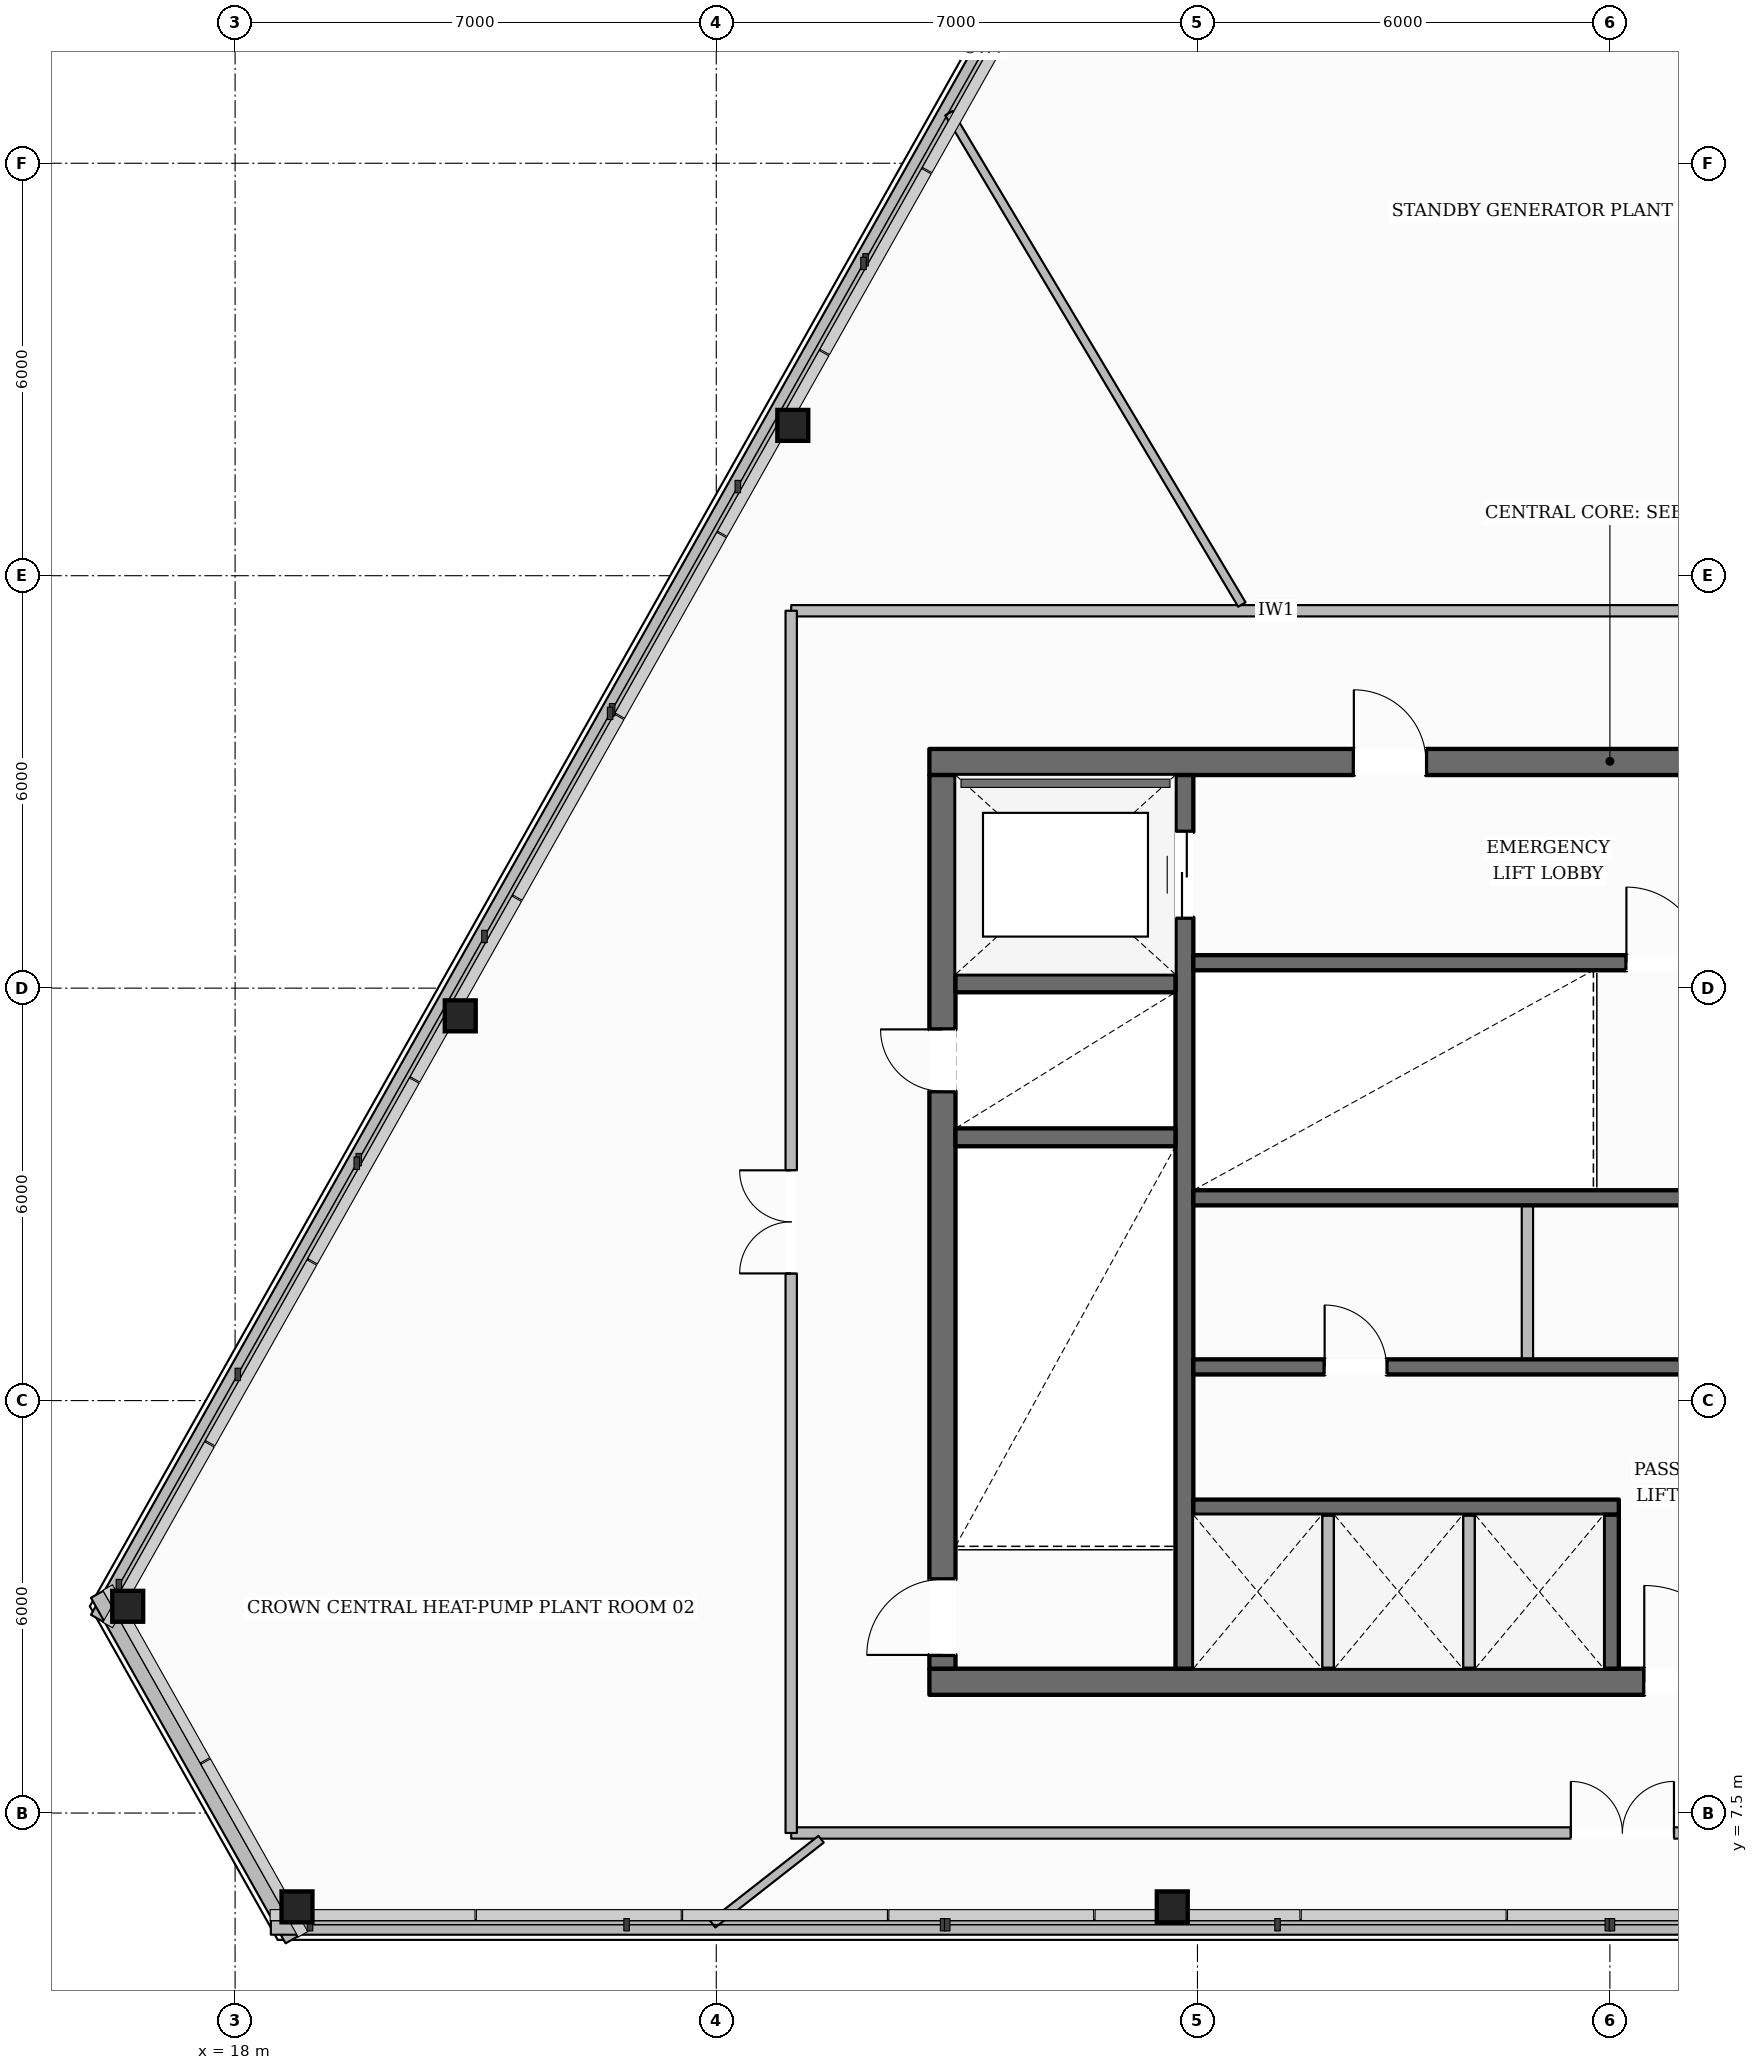
"""IFC4 building model, lengths in metres.
Left out: names, types, materials, properties, quantities, classifications, styles, units other than length and angle.
Written with IfcOpenShell. Run it as: python <this file> out.ifc"""

import sys

from ifc_helpers import new_model, si_unit, direction, frame, frame_2d, origin, origin_2d, place, context, subcontext, project, spatial, rectangle, hollow_rectangle, extrude, element, fill, save


model = new_model("IFC4")
c1 = context("Model", 3, precision=1e-05, world=origin(), true_north=direction((0.0, 1.0)))
c2 = subcontext(c1, "Body", "Model", "MODEL_VIEW")
j1 = project(units=[si_unit("LENGTHUNIT", "METRE"), si_unit("PLANEANGLEUNIT", "RADIAN")], contexts=[c1])
p1 = place(None, origin())
s1 = spatial("IfcSite", under=j1, at=p1, CompositionType="ELEMENT")
p2 = place(p1, origin())
s2 = spatial("IfcBuilding", under=s1, at=p2, CompositionType="ELEMENT")
p3 = place(p2, frame((0.0, 0.0, 309.95)))
s3 = spatial("IfcBuildingStorey", under=s2, at=p3, CompositionType="ELEMENT", Elevation=309.95)
p4 = place(p3, frame((28.1, 9.41, 0.0), z_axis=(0.0, 0.0, 1.0), x_axis=(1.0, 0.0, 0.0)))
e1 = element("IfcWall", 1, at=p4, inside=s3, PredefinedType="SOLIDWALL", context=c2, shape_type="SweptSolid", body=[
    extrude(rectangle(XDim=19.8, YDim=0.38, at=frame_2d((9.9, 0.0))), origin(), (0.0, 0.0, 1.0), 5.52),
])
p5 = place(p4, frame((10.4, 0.0, 0.0)))
e2 = element("IfcOpeningElement", 2, at=p5, cuts=e1, PredefinedType="OPENING", context=c2, shape_type="SweptSolid", body=[
    extrude(rectangle(XDim=1.4, YDim=2.2, at=frame_2d((0.7, 1.1))), frame((0.0, 0.2, 0.0), z_axis=(0.0, -1.0, 0.0), x_axis=(1.0, 0.0, 0.0)), (0.0, 0.0, 1.0), 0.4),
])
p6 = place(p3, frame((28.1, 22.79, 0.0), z_axis=(0.0, 0.0, 1.0), x_axis=(1.0, 0.0, 0.0)))
e3 = element("IfcWall", 3, at=p6, inside=s3, PredefinedType="SOLIDWALL", context=c2, shape_type="SweptSolid", body=[
    extrude(rectangle(XDim=19.8, YDim=0.38, at=frame_2d((9.9, 0.0))), origin(), (0.0, 0.0, 1.0), 5.52),
])
p7 = place(p6, frame((6.175, 0.0, 0.0)))
e4 = element("IfcOpeningElement", 4, at=p7, cuts=e3, PredefinedType="OPENING", context=c2, shape_type="SweptSolid", body=[
    extrude(rectangle(XDim=1.05, YDim=2.15, at=frame_2d((0.525, 1.075))), frame((0.0, 0.2, 0.0), z_axis=(0.0, -1.0, 0.0), x_axis=(1.0, 0.0, 0.0)), (0.0, 0.0, 1.0), 0.4),
])
p8 = place(p6, frame((12.575, 0.0, 0.0)))
e5 = element("IfcOpeningElement", 5, at=p8, cuts=e3, PredefinedType="OPENING", context=c2, shape_type="SweptSolid", body=[
    extrude(rectangle(XDim=1.05, YDim=2.15, at=frame_2d((0.525, 1.075))), frame((0.0, 0.2, 0.0), z_axis=(0.0, -1.0, 0.0), x_axis=(1.0, 0.0, 0.0)), (0.0, 0.0, 1.0), 0.4),
])
p9 = place(p3, frame((28.29, 9.6, 0.0), z_axis=(0.0, 0.0, 1.0), x_axis=(0.0, 1.0, 0.0)))
e6 = element("IfcWall", 6, at=p9, inside=s3, PredefinedType="SOLIDWALL", context=c2, shape_type="SweptSolid", body=[
    extrude(rectangle(XDim=13.0, YDim=0.38, at=frame_2d((6.5, 0.0))), origin(), (0.0, 0.0, 1.0), 5.52),
])
p10 = place(p9, frame((0.2, 0.0, 0.0)))
e7 = element("IfcOpeningElement", 7, at=p10, cuts=e6, PredefinedType="OPENING", context=c2, shape_type="SweptSolid", body=[
    extrude(rectangle(XDim=1.1, YDim=2.15, at=frame_2d((0.55, 1.075))), frame((0.0, 0.2, 0.0), z_axis=(0.0, -1.0, 0.0), x_axis=(1.0, 0.0, 0.0)), (0.0, 0.0, 1.0), 0.4),
])
p11 = place(p9, frame((8.4, 0.0, 0.0)))
e8 = element("IfcOpeningElement", 8, at=p11, cuts=e6, PredefinedType="OPENING", context=c2, shape_type="SweptSolid", body=[
    extrude(rectangle(XDim=0.9, YDim=2.1, at=frame_2d((0.45, 1.05))), frame((0.0, 0.2, 0.0), z_axis=(0.0, -1.0, 0.0), x_axis=(1.0, 0.0, 0.0)), (0.0, 0.0, 1.0), 0.4),
])
p12 = place(p3, frame((31.81, 9.6, 0.0), z_axis=(0.0, 0.0, 1.0), x_axis=(0.0, 1.0, 0.0)))
e9 = element("IfcWall", 9, at=p12, inside=s3, PredefinedType="SHEAR", context=c2, shape_type="SweptSolid", body=[
    extrude(rectangle(XDim=13.0, YDim=0.26, at=frame_2d((6.5, 0.0))), origin(), (0.0, 0.0, 1.0), 5.52),
])
p13 = place(p12, frame((10.925, 0.0, 0.0)))
e10 = element("IfcOpeningElement", 10, at=p13, cuts=e9, PredefinedType="OPENING", context=c2, shape_type="SweptSolid", body=[
    extrude(rectangle(XDim=1.25, YDim=2.25, at=frame_2d((0.625, 1.125))), frame((0.0, 0.14, 0.0), z_axis=(0.0, -1.0, 0.0), x_axis=(1.0, 0.0, 0.0)), (0.0, 0.0, 1.0), 0.28),
])
for number, where, z_axis, x_axis in (
    (11, (28.48, 17.33, 0.0), (0.0, 0.0, 1.0), (1.0, 0.0, 0.0)),
    (12, (28.48, 19.57, 0.0), (0.0, 0.0, 1.0), (1.0, 0.0, 0.0)),
):
    element("IfcWall", number, at=place(p3, frame(where, z_axis=z_axis, x_axis=x_axis)), inside=s3, PredefinedType="SHEAR", context=c2, shape_type="SweptSolid", body=[
        extrude(rectangle(XDim=3.2, YDim=0.26, at=frame_2d((1.6, 0.0))), origin(), (0.0, 0.0, 1.0), 5.52),
    ])
p14 = place(p3, frame((31.94, 19.87, 0.0), z_axis=(0.0, 0.0, 1.0), x_axis=(1.0, 0.0, 0.0)))
e13 = element("IfcWall", 13, at=p14, inside=s3, PredefinedType="SOLIDWALL", context=c2, shape_type="SweptSolid", body=[
    extrude(rectangle(XDim=12.12, YDim=0.22, at=frame_2d((6.06, 0.0))), origin(), (0.0, 0.0, 1.0), 5.52),
])
p15 = place(p14, frame((6.3, 0.0, 0.0)))
e14 = element("IfcOpeningElement", 14, at=p15, cuts=e13, PredefinedType="OPENING", context=c2, shape_type="SweptSolid", body=[
    extrude(rectangle(XDim=1.1, YDim=2.15, at=frame_2d((0.55, 1.075))), frame((0.0, 0.12, 0.0), z_axis=(0.0, -1.0, 0.0), x_axis=(1.0, 0.0, 0.0)), (0.0, 0.0, 1.0), 0.24),
])
p16 = place(p14, frame((8.23, 0.0, 0.0)))
e15 = element("IfcOpeningElement", 15, at=p16, cuts=e13, PredefinedType="OPENING", context=c2, shape_type="SweptSolid", body=[
    extrude(rectangle(XDim=0.9, YDim=2.1, at=frame_2d((0.45, 1.05))), frame((0.0, 0.12, 0.0), z_axis=(0.0, -1.0, 0.0), x_axis=(1.0, 0.0, 0.0)), (0.0, 0.0, 1.0), 0.24),
])
p17 = place(p14, frame((10.45, 0.0, 0.0)))
e16 = element("IfcOpeningElement", 16, at=p17, cuts=e13, PredefinedType="OPENING", context=c2, shape_type="SweptSolid", body=[
    extrude(rectangle(XDim=0.9, YDim=2.1, at=frame_2d((0.45, 1.05))), frame((0.0, 0.12, 0.0), z_axis=(0.0, -1.0, 0.0), x_axis=(1.0, 0.0, 0.0)), (0.0, 0.0, 1.0), 0.24),
])
p18 = place(p3, frame((31.94, 16.45, 0.0), z_axis=(0.0, 0.0, 1.0), x_axis=(1.0, 0.0, 0.0)))
e17 = element("IfcWall", 17, at=p18, inside=s3, PredefinedType="SOLIDWALL", context=c2, shape_type="SweptSolid", body=[
    extrude(rectangle(XDim=12.12, YDim=0.22, at=frame_2d((6.06, 0.0))), origin(), (0.0, 0.0, 1.0), 5.52),
])
p19 = place(p3, frame((31.94, 13.99, 0.0), z_axis=(0.0, 0.0, 1.0), x_axis=(1.0, 0.0, 0.0)))
e18 = element("IfcWall", 18, at=p19, inside=s3, PredefinedType="SOLIDWALL", context=c2, shape_type="SweptSolid", body=[
    extrude(rectangle(XDim=12.12, YDim=0.22, at=frame_2d((6.06, 0.0))), origin(), (0.0, 0.0, 1.0), 5.52),
])
p20 = place(p19, frame((1.91, 0.0, 0.0)))
e19 = element("IfcOpeningElement", 19, at=p20, cuts=e18, PredefinedType="OPENING", context=c2, shape_type="SweptSolid", body=[
    extrude(rectangle(XDim=0.9, YDim=2.1, at=frame_2d((0.45, 1.05))), frame((0.0, 0.12, 0.0), z_axis=(0.0, -1.0, 0.0), x_axis=(1.0, 0.0, 0.0)), (0.0, 0.0, 1.0), 0.24),
])
p21 = place(p19, frame((7.95, 0.0, 0.0)))
e20 = element("IfcOpeningElement", 20, at=p21, cuts=e18, PredefinedType="OPENING", context=c2, shape_type="SweptSolid", body=[
    extrude(rectangle(XDim=1.02, YDim=2.15, at=frame_2d((0.51, 1.075))), frame((0.0, 0.12, 0.0), z_axis=(0.0, -1.0, 0.0), x_axis=(1.0, 0.0, 0.0)), (0.0, 0.0, 1.0), 0.24),
])
p22 = place(p3, frame((31.94, 11.95, 0.0), z_axis=(0.0, 0.0, 1.0), x_axis=(1.0, 0.0, 0.0)))
e21 = element("IfcWall", 21, at=p22, inside=s3, PredefinedType="SOLIDWALL", context=c2, shape_type="SweptSolid", body=[
    extrude(rectangle(XDim=6.19, YDim=0.22, at=frame_2d((3.095, 0.0))), origin(), (0.0, 0.0, 1.0), 5.52),
])
p23 = place(p3, frame((38.02, 9.6, 0.0), z_axis=(0.0, 0.0, 1.0), x_axis=(0.0, 1.0, 0.0)))
e22 = element("IfcWall", 22, at=p23, inside=s3, PredefinedType="SOLIDWALL", context=c2, shape_type="SweptSolid", body=[
    extrude(rectangle(XDim=2.24, YDim=0.22, at=frame_2d((1.12, 0.0))), origin(), (0.0, 0.0, 1.0), 5.52),
])
for number, where, z_axis, x_axis in (
    (23, (26.113, 27.687, 0.0), (0.0, 0.0, 1.0), (1.0, 0.0, 0.0)),
    (24, (21.275, 19.097, 0.0), (0.0, 0.0, 1.0), (1.0, 0.0, 0.0)),
    (25, (16.438, 10.508, 0.0), (0.0, 0.0, 1.0), (1.0, 0.0, 0.0)),
    (26, (18.9, 6.135, 0.0), (0.0, 0.0, 1.0), (1.0, 0.0, 0.0)),
    (27, (31.634, 6.135, 0.0), (0.0, 0.0, 1.0), (1.0, 0.0, 0.0)),
):
    element("IfcColumn", number, at=place(p3, frame(where, z_axis=z_axis, x_axis=x_axis)), inside=s3, PredefinedType="USERDEFINED", context=c2, shape_type="SweptSolid", body=[
        extrude(hollow_rectangle(XDim=0.45, YDim=0.45, WallThickness=0.022, at=origin_2d()), origin(), (0.0, 0.0, 1.0), 5.52),
    ])
p24 = place(p3, frame((30.876, 36.755, 0.0), z_axis=(0.0, 0.0, 1.0), x_axis=(-0.490730545971, -0.87131138593, 0.0)))
e28 = element("IfcWall", 28, at=p24, inside=s3, PredefinedType="PARAPET", context=c2, shape_type="SweptSolid", body=[
    extrude(rectangle(XDim=30.325, YDim=0.21, at=frame_2d((15.163, 0.0))), origin(), (0.0, 0.0, 1.0), 0.55),
])
p25 = place(p3, frame((15.995, 10.683, 0.0), z_axis=(0.0, 0.0, 1.0), x_axis=(0.490715240018, -0.871320006206, 0.0)))
e29 = element("IfcWall", 29, at=p25, inside=s3, PredefinedType="PARAPET", context=c2, shape_type="SweptSolid", body=[
    extrude(rectangle(XDim=5.769, YDim=0.21, at=frame_2d((2.885, 0.0))), origin(), (0.0, 0.0, 1.0), 0.55),
])
p26 = place(p3, frame((18.52, 5.835, 0.0), z_axis=(0.0, 0.0, 1.0), x_axis=(1.0, 0.0, 0.0)))
e30 = element("IfcWall", 30, at=p26, inside=s3, PredefinedType="PARAPET", context=c2, shape_type="SweptSolid", body=[
    extrude(rectangle(XDim=38.96, YDim=0.21, at=frame_2d((19.48, 0.0))), origin(), (0.0, 0.0, 1.0), 0.55),
])
for number, where, z_axis, x_axis in (
    (31, (33.9, 9.49, 0.0), (0.0, 0.0, 1.0), (0.0, 1.0, 0.0)),
    (32, (35.95, 9.49, 0.0), (0.0, 0.0, 1.0), (0.0, 1.0, 0.0)),
):
    element("IfcWall", number, at=place(p3, frame(where, z_axis=z_axis, x_axis=x_axis)), inside=s3, PredefinedType="PARTITIONING", context=c2, shape_type="SweptSolid", body=[
        extrude(rectangle(XDim=2.35, YDim=0.165, at=frame_2d((1.175, 0.0))), origin(), (0.0, 0.0, 1.0), 5.52),
    ])
p27 = place(p3, frame((36.8, 14.1, 0.0), z_axis=(0.0, 0.0, 1.0), x_axis=(0.0, 1.0, 0.0)))
e33 = element("IfcWall", 33, at=p27, inside=s3, PredefinedType="PARTITIONING", context=c2, shape_type="SweptSolid", body=[
    extrude(rectangle(XDim=2.24, YDim=0.165, at=frame_2d((1.12, 0.0))), origin(), (0.0, 0.0, 1.0), 5.52),
])
p28 = place(p3, frame((26.09, 24.99, 0.0), z_axis=(0.0, 0.0, 1.0), x_axis=(1.0, 0.0, 0.0)))
e34 = element("IfcWall", 34, at=p28, inside=s3, PredefinedType="PARTITIONING", context=c2, shape_type="SweptSolid", body=[
    extrude(rectangle(XDim=23.82, YDim=0.165, at=frame_2d((11.91, 0.0))), origin(), (0.0, 0.0, 1.0), 5.52),
])
p29 = place(p28, frame((14.362, 0.0, 0.0)))
e35 = element("IfcOpeningElement", 35, at=p29, cuts=e34, PredefinedType="OPENING", context=c2, shape_type="SweptSolid", body=[
    extrude(rectangle(XDim=1.5, YDim=2.25, at=frame_2d((0.75, 1.125))), frame((0.0, 0.093, 0.0), z_axis=(0.0, -1.0, 0.0), x_axis=(1.0, 0.0, 0.0)), (0.0, 0.0, 1.0), 0.185),
])
p30 = place(p3, frame((26.09, 7.21, 0.0), z_axis=(0.0, 0.0, 1.0), x_axis=(1.0, 0.0, 0.0)))
e36 = element("IfcWall", 36, at=p30, inside=s3, PredefinedType="PARTITIONING", context=c2, shape_type="SweptSolid", body=[
    extrude(rectangle(XDim=23.82, YDim=0.165, at=frame_2d((11.91, 0.0))), origin(), (0.0, 0.0, 1.0), 5.52),
])
p31 = place(p30, frame((11.342, 0.0, 0.0)))
e37 = element("IfcOpeningElement", 37, at=p31, cuts=e36, PredefinedType="OPENING", context=c2, shape_type="SweptSolid", body=[
    extrude(rectangle(XDim=1.5, YDim=2.25, at=frame_2d((0.75, 1.125))), frame((0.0, 0.093, 0.0), z_axis=(0.0, -1.0, 0.0), x_axis=(1.0, 0.0, 0.0)), (0.0, 0.0, 1.0), 0.185),
])
p32 = place(p3, frame((26.09, 7.21, 0.0), z_axis=(0.0, 0.0, 1.0), x_axis=(0.0, 1.0, 0.0)))
e38 = element("IfcWall", 38, at=p32, inside=s3, PredefinedType="PARTITIONING", context=c2, shape_type="SweptSolid", body=[
    extrude(rectangle(XDim=17.78, YDim=0.165, at=frame_2d((8.89, 0.0))), origin(), (0.0, 0.0, 1.0), 5.52),
])
p33 = place(p32, frame((8.14, 0.0, 0.0)))
e39 = element("IfcOpeningElement", 39, at=p33, cuts=e38, PredefinedType="OPENING", context=c2, shape_type="SweptSolid", body=[
    extrude(rectangle(XDim=1.5, YDim=2.25, at=frame_2d((0.75, 1.125))), frame((0.0, 0.093, 0.0), z_axis=(0.0, -1.0, 0.0), x_axis=(1.0, 0.0, 0.0)), (0.0, 0.0, 1.0), 0.185),
])
p34 = place(p3, frame((32.646, 25.081, 0.0), z_axis=(0.0, 0.0, 1.0), x_axis=(-0.512069120889, 0.858944244658, 0.0)))
e40 = element("IfcWall", 40, at=p34, inside=s3, PredefinedType="PARTITIONING", context=c2, shape_type="SweptSolid", body=[
    extrude(rectangle(XDim=8.322, YDim=0.125, at=frame_2d((4.161, 0.0))), origin(), (0.0, 0.0, 1.0), 5.061),
])
p35 = place(p3, frame((26.525, 7.119, 0.0), z_axis=(0.0, 0.0, 1.0), x_axis=(-0.787530721522, -0.616275395143, 0.0)))
e41 = element("IfcWall", 41, at=p35, inside=s3, PredefinedType="PARTITIONING", context=c2, shape_type="SweptSolid", body=[
    extrude(rectangle(XDim=2.003, YDim=0.125, at=frame_2d((1.001, 0.0))), origin(), (0.0, 0.0, 1.0), 5.52),
])
p36 = place(p10, origin())
e42 = element("IfcDoor", 42, at=p36, inside=s3, OperationType="SINGLE_SWING_LEFT", PredefinedType="DOOR", context=c2, shape_type="SweptSolid", body=[
    extrude(rectangle(XDim=1.1, YDim=2.15, at=frame_2d((0.55, 1.075))), frame((0.0, 0.025, 0.0), z_axis=(0.0, -1.0, 0.0), x_axis=(1.0, 0.0, 0.0)), (0.0, 0.0, 1.0), 0.05),
])
fill(e7, e42)
p37 = place(p15, origin())
e43 = element("IfcDoor", 43, at=p37, inside=s3, OperationType="SINGLE_SWING_LEFT", PredefinedType="DOOR", context=c2, shape_type="SweptSolid", body=[
    extrude(rectangle(XDim=1.1, YDim=2.15, at=frame_2d((0.55, 1.075))), frame((0.0, 0.025, 0.0), z_axis=(0.0, -1.0, 0.0), x_axis=(1.0, 0.0, 0.0)), (0.0, 0.0, 1.0), 0.05),
])
fill(e14, e43)
p38 = place(p11, origin())
e44 = element("IfcDoor", 44, at=p38, inside=s3, OperationType="SINGLE_SWING_RIGHT", PredefinedType="DOOR", context=c2, shape_type="SweptSolid", body=[
    extrude(rectangle(XDim=0.9, YDim=2.1, at=frame_2d((0.45, 1.05))), frame((0.0, 0.025, 0.0), z_axis=(0.0, -1.0, 0.0), x_axis=(1.0, 0.0, 0.0)), (0.0, 0.0, 1.0), 0.05),
])
fill(e8, e44)
p39 = place(p7, origin())
e45 = element("IfcDoor", 45, at=p39, inside=s3, OperationType="SINGLE_SWING_LEFT", PredefinedType="DOOR", context=c2, shape_type="SweptSolid", body=[
    extrude(rectangle(XDim=1.05, YDim=2.15, at=frame_2d((0.525, 1.075))), frame((0.0, 0.025, 0.0), z_axis=(0.0, -1.0, 0.0), x_axis=(1.0, 0.0, 0.0)), (0.0, 0.0, 1.0), 0.05),
])
fill(e4, e45)
p40 = place(p13, origin())
e46 = element("IfcDoor", 46, at=p40, inside=s3, OperationType="DOUBLE_DOOR_SLIDING", PredefinedType="DOOR", context=c2, shape_type="SweptSolid", body=[
    extrude(rectangle(XDim=1.25, YDim=2.25, at=frame_2d((0.625, 1.125))), frame((0.0, 0.025, 0.0), z_axis=(0.0, -1.0, 0.0), x_axis=(1.0, 0.0, 0.0)), (0.0, 0.0, 1.0), 0.05),
])
fill(e10, e46)
p41 = place(p5, origin())
e47 = element("IfcDoor", 47, at=p41, inside=s3, OperationType="SINGLE_SWING_LEFT", PredefinedType="DOOR", context=c2, shape_type="SweptSolid", body=[
    extrude(rectangle(XDim=1.4, YDim=2.2, at=frame_2d((0.7, 1.1))), frame((0.0, 0.025, 0.0), z_axis=(0.0, -1.0, 0.0), x_axis=(1.0, 0.0, 0.0)), (0.0, 0.0, 1.0), 0.05),
])
fill(e2, e47)
p42 = place(p20, origin())
e48 = element("IfcDoor", 48, at=p42, inside=s3, OperationType="SINGLE_SWING_LEFT", PredefinedType="DOOR", context=c2, shape_type="SweptSolid", body=[
    extrude(rectangle(XDim=0.9, YDim=2.1, at=frame_2d((0.45, 1.05))), frame((0.0, 0.025, 0.0), z_axis=(0.0, -1.0, 0.0), x_axis=(1.0, 0.0, 0.0)), (0.0, 0.0, 1.0), 0.05),
])
fill(e19, e48)
p43 = place(p33, origin())
e49 = element("IfcDoor", 49, at=p43, inside=s3, OperationType="DOUBLE_DOOR_SINGLE_SWING", PredefinedType="DOOR", context=c2, shape_type="SweptSolid", body=[
    extrude(rectangle(XDim=1.5, YDim=2.25, at=frame_2d((0.75, 1.125))), frame((0.0, 0.025, 0.0), z_axis=(0.0, -1.0, 0.0), x_axis=(1.0, 0.0, 0.0)), (0.0, 0.0, 1.0), 0.05),
])
fill(e39, e49)
p44 = place(p31, origin())
e50 = element("IfcDoor", 50, at=p44, inside=s3, OperationType="DOUBLE_DOOR_SINGLE_SWING", PredefinedType="DOOR", context=c2, shape_type="SweptSolid", body=[
    extrude(rectangle(XDim=1.5, YDim=2.25, at=frame_2d((0.75, 1.125))), frame((0.0, 0.025, 0.0), z_axis=(0.0, -1.0, 0.0), x_axis=(1.0, 0.0, 0.0)), (0.0, 0.0, 1.0), 0.05),
])
fill(e37, e50)
save(model, sys.argv[1])
